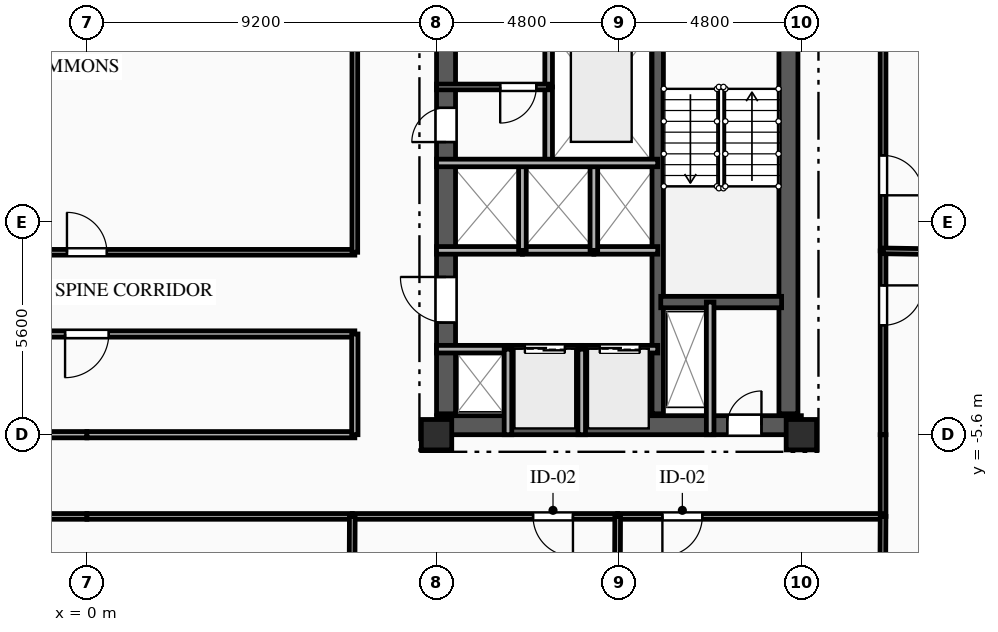
"""IFC4 building model, lengths in metres.
Left out: names, types, materials, properties, quantities, classifications, styles, units other than length and angle.
Written with IfcOpenShell. Run it as: python <this file> out.ifc"""

import sys

from ifc_helpers import new_model, si_unit, direction, frame, frame_2d, origin, origin_2d, place, context, subcontext, project, spatial, rectangle, extrude, element, fill, save


model = new_model("IFC4")
c1 = context("Model", 3, precision=1e-05, world=origin(), true_north=direction((0.0, 1.0)))
c2 = subcontext(c1, "Body", "Model", "MODEL_VIEW")
j1 = project(units=[si_unit("LENGTHUNIT", "METRE"), si_unit("PLANEANGLEUNIT", "RADIAN")], contexts=[c1])
p1 = place(None, origin())
s1 = spatial("IfcSite", under=j1, at=p1, CompositionType="ELEMENT")
p2 = place(p1, origin())
s2 = spatial("IfcBuilding", under=s1, at=p2, CompositionType="ELEMENT")
p3 = place(p2, frame((0.0, 0.0, 196.4)))
s3 = spatial("IfcBuildingStorey", under=s2, at=p3, CompositionType="ELEMENT", Elevation=196.4)
for number, where, z_axis, x_axis in (
    (1, (9.2, -5.6, 0.0), (0.0, 0.0, 1.0), (1.0, 0.0, 0.0)),
    (2, (18.8, -5.6, 0.0), (0.0, 0.0, 1.0), (1.0, 0.0, 0.0)),
):
    element("IfcColumn", number, at=place(p3, frame(where, z_axis=z_axis, x_axis=x_axis)), inside=s3, PredefinedType="COLUMN", context=c2, shape_type="SweptSolid", body=[
        extrude(rectangle(XDim=0.8, YDim=0.8, at=origin_2d()), origin(), (0.0, 0.0, 1.0), 3.35),
    ])
p4 = place(p3, frame((9.2, -5.35, 0.0), z_axis=(0.0, 0.0, 1.0), x_axis=(1.0, 0.0, 0.0)))
e3 = element("IfcWall", 3, at=p4, inside=s3, PredefinedType="SHEAR", context=c2, shape_type="SweptSolid", body=[
    extrude(rectangle(XDim=9.6, YDim=0.5, at=frame_2d((4.8, 0.0))), origin(), (0.0, 0.0, 1.0), 3.04),
])
p5 = place(p4, frame((7.65, 0.0, 0.0)))
e4 = element("IfcOpeningElement", 4, at=p5, cuts=e3, PredefinedType="OPENING", context=c2, shape_type="SweptSolid", body=[
    extrude(rectangle(XDim=0.9, YDim=2.1, at=frame_2d((0.45, 1.05))), frame((0.0, 0.26, 0.0), z_axis=(0.0, -1.0, 0.0), x_axis=(1.0, 0.0, 0.0)), (0.0, 0.0, 1.0), 0.52),
])
p6 = place(p3, frame((9.45, -5.05, 0.0), z_axis=(0.0, 0.0, 1.0), x_axis=(0.0, 1.0, 0.0)))
e5 = element("IfcWall", 5, at=p6, inside=s3, PredefinedType="SHEAR", context=c2, shape_type="SweptSolid", body=[
    extrude(rectangle(XDim=10.1, YDim=0.5, at=frame_2d((5.05, 0.0))), origin(), (0.0, 0.0, 1.0), 3.04),
])
p7 = place(p6, frame((7.15, 0.0, 0.0)))
e6 = element("IfcOpeningElement", 6, at=p7, cuts=e5, PredefinedType="OPENING", context=c2, shape_type="SweptSolid", body=[
    extrude(rectangle(XDim=0.9, YDim=2.1, at=frame_2d((0.45, 1.05))), frame((0.0, 0.26, 0.0), z_axis=(0.0, -1.0, 0.0), x_axis=(1.0, 0.0, 0.0)), (0.0, 0.0, 1.0), 0.52),
])
p8 = place(p6, frame((2.4, 0.0, 0.0)))
e7 = element("IfcOpeningElement", 7, at=p8, cuts=e5, PredefinedType="OPENING", context=c2, shape_type="SweptSolid", body=[
    extrude(rectangle(XDim=1.2, YDim=2.15, at=frame_2d((0.6, 1.075))), frame((0.0, 0.26, 0.0), z_axis=(0.0, -1.0, 0.0), x_axis=(1.0, 0.0, 0.0)), (0.0, 0.0, 1.0), 0.52),
])
p9 = place(p3, frame((18.46, -5.05, 0.0), z_axis=(0.0, 0.0, 1.0), x_axis=(0.0, 1.0, 0.0)))
e8 = element("IfcWall", 8, at=p9, inside=s3, PredefinedType="SHEAR", context=c2, shape_type="SweptSolid", body=[
    extrude(rectangle(XDim=10.1, YDim=0.5, at=frame_2d((5.05, 0.0))), origin(), (0.0, 0.0, 1.0), 3.04),
])
p10 = place(p3, frame((15.02, -5.05, 0.0), z_axis=(0.0, 0.0, 1.0), x_axis=(0.0, 1.0, 0.0)))
e9 = element("IfcWall", 9, at=p10, inside=s3, PredefinedType="SHEAR", context=c2, shape_type="SweptSolid", body=[
    extrude(rectangle(XDim=10.1, YDim=0.3, at=frame_2d((5.05, 0.0))), origin(), (0.0, 0.0, 1.0), 3.04),
])
p11 = place(p3, frame((15.1, -2.11, 0.0), z_axis=(0.0, 0.0, 1.0), x_axis=(1.0, 0.0, 0.0)))
e10 = element("IfcWall", 10, at=p11, inside=s3, PredefinedType="SHEAR", context=c2, shape_type="SweptSolid", body=[
    extrude(rectangle(XDim=3.18, YDim=0.3, at=frame_2d((1.59, 0.0))), origin(), (0.0, 0.0, 1.0), 3.04),
])
p12 = place(p3, frame((16.4, -2.11, 0.0), z_axis=(0.0, 0.0, 1.0), x_axis=(0.0, -1.0, 0.0)))
e11 = element("IfcWall", 11, at=p12, inside=s3, PredefinedType="PARTITIONING", context=c2, shape_type="SweptSolid", body=[
    extrude(rectangle(XDim=3.49, YDim=0.2, at=frame_2d((1.745, 0.0))), origin(), (0.0, 0.0, 1.0), 3.04),
])
p13 = place(p3, frame((12.15, 3.55, 0.0), z_axis=(0.0, 0.0, 1.0), x_axis=(0.0, -1.0, 0.0)))
e12 = element("IfcWall", 12, at=p13, inside=s3, PredefinedType="PARTITIONING", context=c2, shape_type="SweptSolid", body=[
    extrude(rectangle(XDim=2.0, YDim=0.2, at=frame_2d((1.0, 0.0))), origin(), (0.0, 0.0, 1.0), 3.04),
])
p14 = place(p3, frame((12.15, 5.6, 0.0), z_axis=(0.0, 0.0, 1.0), x_axis=(0.0, -1.0, 0.0)))
e13 = element("IfcWall", 13, at=p14, inside=s3, PredefinedType="PARTITIONING", context=c2, shape_type="SweptSolid", body=[
    extrude(rectangle(XDim=2.05, YDim=0.2, at=frame_2d((1.025, 0.0))), origin(), (0.0, 0.0, 1.0), 3.04),
])
p15 = place(p3, frame((12.15, 3.55, 0.0), z_axis=(0.0, 0.0, 1.0), x_axis=(-1.0, 0.0, 0.0)))
e14 = element("IfcWall", 14, at=p15, inside=s3, PredefinedType="PARTITIONING", context=c2, shape_type="SweptSolid", body=[
    extrude(rectangle(XDim=2.95, YDim=0.15, at=frame_2d((1.475, 0.0))), origin(), (0.0, 0.0, 1.0), 3.04),
])
p16 = place(p15, frame((0.325, 0.0, 0.0)))
e15 = element("IfcOpeningElement", 15, at=p16, cuts=e14, PredefinedType="OPENING", context=c2, shape_type="SweptSolid", body=[
    extrude(rectangle(XDim=0.95, YDim=2.1, at=frame_2d((0.475, 1.05))), frame((0.0, 0.085, 0.0), z_axis=(0.0, -1.0, 0.0), x_axis=(1.0, 0.0, 0.0)), (0.0, 0.0, 1.0), 0.17),
])
p17 = place(p3, frame((9.2, -3.35, 0.0), z_axis=(0.0, 0.0, 1.0), x_axis=(1.0, 0.0, 0.0)))
e16 = element("IfcWall", 16, at=p17, inside=s3, PredefinedType="PARTITIONING", context=c2, shape_type="SweptSolid", body=[
    extrude(rectangle(XDim=1.88, YDim=0.2, at=frame_2d((0.94, 0.0))), origin(), (0.0, 0.0, 1.0), 2.755),
])
p18 = place(p3, frame((11.08, -3.35, 0.0), z_axis=(0.0, 0.0, 1.0), x_axis=(1.0, 0.0, 0.0)))
e17 = element("IfcWall", 17, at=p18, inside=s3, PredefinedType="PARTITIONING", context=c2, shape_type="SweptSolid", body=[
    extrude(rectangle(XDim=1.94, YDim=0.2, at=frame_2d((0.97, 0.0))), origin(), (0.0, 0.0, 1.0), 3.04),
])
p19 = place(p18, frame((0.445, 0.0, 0.0)))
e18 = element("IfcOpeningElement", 18, at=p19, cuts=e17, PredefinedType="OPENING", context=c2, shape_type="SweptSolid", body=[
    extrude(rectangle(XDim=1.05, YDim=2.1, at=frame_2d((0.525, 1.05))), frame((0.0, 0.11, 0.0), z_axis=(0.0, -1.0, 0.0), x_axis=(1.0, 0.0, 0.0)), (0.0, 0.0, 1.0), 0.22),
])
p20 = place(p3, frame((13.02, -3.35, 0.0), z_axis=(0.0, 0.0, 1.0), x_axis=(1.0, 0.0, 0.0)))
e19 = element("IfcWall", 19, at=p20, inside=s3, PredefinedType="PARTITIONING", context=c2, shape_type="SweptSolid", body=[
    extrude(rectangle(XDim=2.0, YDim=0.2, at=frame_2d((1.0, 0.0))), origin(), (0.0, 0.0, 1.0), 3.04),
])
p21 = place(p20, frame((0.475, 0.0, 0.0)))
e20 = element("IfcOpeningElement", 20, at=p21, cuts=e19, PredefinedType="OPENING", context=c2, shape_type="SweptSolid", body=[
    extrude(rectangle(XDim=1.05, YDim=2.1, at=frame_2d((0.525, 1.05))), frame((0.0, 0.11, 0.0), z_axis=(0.0, -1.0, 0.0), x_axis=(1.0, 0.0, 0.0)), (0.0, 0.0, 1.0), 0.22),
])
p22 = place(p3, frame((11.46, -0.75, 0.0), z_axis=(0.0, 0.0, 1.0), x_axis=(-1.0, 0.0, 0.0)))
e21 = element("IfcWall", 21, at=p22, inside=s3, PredefinedType="PARTITIONING", context=c2, shape_type="SweptSolid", body=[
    extrude(rectangle(XDim=2.26, YDim=0.2, at=frame_2d((1.13, 0.0))), origin(), (0.0, 0.0, 1.0), 3.04),
])
p23 = place(p3, frame((13.34, -0.75, 0.0), z_axis=(0.0, 0.0, 1.0), x_axis=(-1.0, 0.0, 0.0)))
e22 = element("IfcWall", 22, at=p23, inside=s3, PredefinedType="PARTITIONING", context=c2, shape_type="SweptSolid", body=[
    extrude(rectangle(XDim=1.88, YDim=0.2, at=frame_2d((0.94, 0.0))), origin(), (0.0, 0.0, 1.0), 3.04),
])
p24 = place(p3, frame((15.02, -0.75, 0.0), z_axis=(0.0, 0.0, 1.0), x_axis=(-1.0, 0.0, 0.0)))
e23 = element("IfcWall", 23, at=p24, inside=s3, PredefinedType="PARTITIONING", context=c2, shape_type="SweptSolid", body=[
    extrude(rectangle(XDim=1.68, YDim=0.2, at=frame_2d((0.84, 0.0))), origin(), (0.0, 0.0, 1.0), 3.04),
])
for number, where, z_axis, x_axis in (
    (24, (11.08, -5.6, 0.0), (0.0, 0.0, 1.0), (0.0, 1.0, 0.0)),
    (25, (13.02, -5.6, 0.0), (0.0, 0.0, 1.0), (0.0, 1.0, 0.0)),
):
    element("IfcWall", number, at=place(p3, frame(where, z_axis=z_axis, x_axis=x_axis)), inside=s3, PredefinedType="PARTITIONING", context=c2, shape_type="SweptSolid", body=[
        extrude(rectangle(XDim=2.25, YDim=0.2, at=frame_2d((1.125, 0.0))), origin(), (0.0, 0.0, 1.0), 3.04),
    ])
for number, where, z_axis, x_axis in (
    (26, (11.46, -0.75, 0.0), (0.0, 0.0, 1.0), (0.0, 1.0, 0.0)),
    (27, (13.34, -0.75, 0.0), (0.0, 0.0, 1.0), (0.0, 1.0, 0.0)),
):
    element("IfcWall", number, at=place(p3, frame(where, z_axis=z_axis, x_axis=x_axis)), inside=s3, PredefinedType="PARTITIONING", context=c2, shape_type="SweptSolid", body=[
        extrude(rectangle(XDim=2.3, YDim=0.2, at=frame_2d((1.15, 0.0))), origin(), (0.0, 0.0, 1.0), 3.04),
    ])
p25 = place(p3, frame((0.0, -7.75, 0.0), z_axis=(0.0, 0.0, 1.0), x_axis=(-1.0, 0.0, 0.0)))
e28 = element("IfcWall", 28, at=p25, inside=s3, PredefinedType="PARTITIONING", context=c2, shape_type="SweptSolid", body=[
    extrude(rectangle(XDim=6.983, YDim=0.15, at=frame_2d((3.491, 0.0))), origin(), (0.0, 0.0, 1.0), 3.04),
])
p26 = place(p25, frame((1.177, 0.0, 0.0)))
e29 = element("IfcOpeningElement", 29, at=p26, cuts=e28, PredefinedType="OPENING", context=c2, shape_type="SweptSolid", body=[
    extrude(rectangle(XDim=1.05, YDim=2.15, at=frame_2d((0.525, 1.075))), frame((0.0, 0.085, 0.0), z_axis=(0.0, -1.0, 0.0), x_axis=(1.0, 0.0, 0.0)), (0.0, 0.0, 1.0), 0.17),
])
p27 = place(p3, frame((-7.05, -5.6, 0.0), z_axis=(0.0, 0.0, 1.0), x_axis=(1.0, 0.0, 0.0)))
e30 = element("IfcWall", 30, at=p27, inside=s3, PredefinedType="PARTITIONING", context=c2, shape_type="SweptSolid", body=[
    extrude(rectangle(XDim=7.05, YDim=0.165, at=frame_2d((3.525, 0.0))), origin(), (0.0, 0.0, 1.0), 2.525),
])
p28 = place(p3, frame((20.95, -5.6, 0.0), z_axis=(0.0, 0.0, 1.0), x_axis=(0.0, -1.0, 0.0)))
e31 = element("IfcWall", 31, at=p28, inside=s3, PredefinedType="PARTITIONING", context=c2, shape_type="SweptSolid", body=[
    extrude(rectangle(XDim=2.15, YDim=0.15, at=frame_2d((1.075, 0.0))), origin(), (0.0, 0.0, 1.0), 3.04),
])
p29 = place(p3, frame((6.983, -7.75, 0.0), z_axis=(0.0, 0.0, 1.0), x_axis=(-1.0, 0.0, 0.0)))
e32 = element("IfcWall", 32, at=p29, inside=s3, PredefinedType="PARTITIONING", context=c2, shape_type="SweptSolid", body=[
    extrude(rectangle(XDim=6.983, YDim=0.15, at=frame_2d((3.491, 0.0))), origin(), (0.0, 0.0, 1.0), 3.04),
])
p30 = place(p3, frame((13.967, -7.75, 0.0), z_axis=(0.0, 0.0, 1.0), x_axis=(-1.0, 0.0, 0.0)))
e33 = element("IfcWall", 33, at=p30, inside=s3, PredefinedType="PARTITIONING", context=c2, shape_type="SweptSolid", body=[
    extrude(rectangle(XDim=6.984, YDim=0.15, at=frame_2d((3.492, 0.0))), origin(), (0.0, 0.0, 1.0), 3.04),
])
p31 = place(p30, frame((1.177, 0.0, 0.0)))
e34 = element("IfcOpeningElement", 34, at=p31, cuts=e33, PredefinedType="OPENING", context=c2, shape_type="SweptSolid", body=[
    extrude(rectangle(XDim=1.05, YDim=2.15, at=frame_2d((0.525, 1.075))), frame((0.0, 0.085, 0.0), z_axis=(0.0, -1.0, 0.0), x_axis=(1.0, 0.0, 0.0)), (0.0, 0.0, 1.0), 0.17),
])
p32 = place(p3, frame((20.95, -7.75, 0.0), z_axis=(0.0, 0.0, 1.0), x_axis=(-1.0, 0.0, 0.0)))
e35 = element("IfcWall", 35, at=p32, inside=s3, PredefinedType="PARTITIONING", context=c2, shape_type="SweptSolid", body=[
    extrude(rectangle(XDim=6.983, YDim=0.15, at=frame_2d((3.492, 0.0))), origin(), (0.0, 0.0, 1.0), 3.04),
])
p33 = place(p32, frame((4.757, 0.0, 0.0)))
e36 = element("IfcOpeningElement", 36, at=p33, cuts=e35, PredefinedType="OPENING", context=c2, shape_type="SweptSolid", body=[
    extrude(rectangle(XDim=1.05, YDim=2.15, at=frame_2d((0.525, 1.075))), frame((0.0, 0.085, 0.0), z_axis=(0.0, -1.0, 0.0), x_axis=(1.0, 0.0, 0.0)), (0.0, 0.0, 1.0), 0.17),
])
p34 = place(p3, frame((0.0, -5.6, 0.0), z_axis=(0.0, 0.0, 1.0), x_axis=(1.0, 0.0, 0.0)))
e37 = element("IfcWall", 37, at=p34, inside=s3, PredefinedType="PARTITIONING", context=c2, shape_type="SweptSolid", body=[
    extrude(rectangle(XDim=7.05, YDim=0.165, at=frame_2d((3.525, 0.0))), origin(), (0.0, 0.0, 1.0), 2.525),
])
p35 = place(p3, frame((20.95, -0.763, 0.0), z_axis=(0.0, 0.0, 1.0), x_axis=(0.0, -1.0, 0.0)))
e38 = element("IfcWall", 38, at=p35, inside=s3, PredefinedType="PARTITIONING", context=c2, shape_type="SweptSolid", body=[
    extrude(rectangle(XDim=4.837, YDim=0.15, at=frame_2d((2.418, 0.0))), origin(), (0.0, 0.0, 1.0), 2.695),
])
p36 = place(p35, frame((0.908, 0.0, 0.0)))
e39 = element("IfcOpeningElement", 39, at=p36, cuts=e38, PredefinedType="OPENING", context=c2, shape_type="SweptSolid", body=[
    extrude(rectangle(XDim=1.05, YDim=2.15, at=frame_2d((0.525, 1.075))), frame((0.0, 0.085, 0.0), z_axis=(0.0, -1.0, 0.0), x_axis=(1.0, 0.0, 0.0)), (0.0, 0.0, 1.0), 0.17),
])
p37 = place(p3, frame((20.95, 8.5, 0.0), z_axis=(0.0, 0.0, 1.0), x_axis=(0.0, -1.0, 0.0)))
e40 = element("IfcWall", 40, at=p37, inside=s3, PredefinedType="PARTITIONING", context=c2, shape_type="SweptSolid", body=[
    extrude(rectangle(XDim=9.263, YDim=0.15, at=frame_2d((4.632, 0.0))), origin(), (0.0, 0.0, 1.0), 2.695),
])
p38 = place(p37, frame((6.751, 0.0, 0.0)))
e41 = element("IfcOpeningElement", 41, at=p38, cuts=e40, PredefinedType="OPENING", context=c2, shape_type="SweptSolid", body=[
    extrude(rectangle(XDim=1.05, YDim=2.15, at=frame_2d((0.525, 1.075))), frame((0.0, 0.085, 0.0), z_axis=(0.0, -1.0, 0.0), x_axis=(1.0, 0.0, 0.0)), (0.0, 0.0, 1.0), 0.17),
])
p39 = place(p3, frame((-7.05, -0.8, 0.0), z_axis=(0.0, 0.0, 1.0), x_axis=(1.0, 0.0, 0.0)))
e42 = element("IfcWall", 42, at=p39, inside=s3, PredefinedType="PARTITIONING", context=c2, shape_type="SweptSolid", body=[
    extrude(rectangle(XDim=14.1, YDim=0.15, at=frame_2d((7.05, 0.0))), origin(), (0.0, 0.0, 1.0), 3.04),
])
p40 = place(p39, frame((6.525, 0.0, 0.0)))
e43 = element("IfcOpeningElement", 43, at=p40, cuts=e42, PredefinedType="OPENING", context=c2, shape_type="SweptSolid", body=[
    extrude(rectangle(XDim=1.05, YDim=2.15, at=frame_2d((0.525, 1.075))), frame((0.0, 0.085, 0.0), z_axis=(0.0, -1.0, 0.0), x_axis=(1.0, 0.0, 0.0)), (0.0, 0.0, 1.0), 0.17),
])
p41 = place(p3, frame((7.05, -2.95, 0.0), z_axis=(0.0, 0.0, 1.0), x_axis=(-1.0, 0.0, 0.0)))
e44 = element("IfcWall", 44, at=p41, inside=s3, PredefinedType="PARTITIONING", context=c2, shape_type="SweptSolid", body=[
    extrude(rectangle(XDim=14.1, YDim=0.165, at=frame_2d((7.05, 0.0))), origin(), (0.0, 0.0, 1.0), 3.04),
])
p42 = place(p41, frame((6.475, 0.0, 0.0)))
e45 = element("IfcOpeningElement", 45, at=p42, cuts=e44, PredefinedType="OPENING", context=c2, shape_type="SweptSolid", body=[
    extrude(rectangle(XDim=1.15, YDim=2.15, at=frame_2d((0.575, 1.075))), frame((0.0, 0.093, 0.0), z_axis=(0.0, -1.0, 0.0), x_axis=(1.0, 0.0, 0.0)), (0.0, 0.0, 1.0), 0.185),
])
p43 = place(p3, frame((7.05, -0.8, 0.0), z_axis=(0.0, 0.0, 1.0), x_axis=(0.0, 1.0, 0.0)))
e46 = element("IfcWall", 46, at=p43, inside=s3, PredefinedType="PARTITIONING", context=c2, shape_type="SweptSolid", body=[
    extrude(rectangle(XDim=9.3, YDim=0.15, at=frame_2d((4.65, 0.0))), origin(), (0.0, 0.0, 1.0), 3.04),
])
p44 = place(p3, frame((7.05, -5.6, 0.0), z_axis=(0.0, 0.0, 1.0), x_axis=(0.0, 1.0, 0.0)))
e47 = element("IfcWall", 47, at=p44, inside=s3, PredefinedType="PARTITIONING", context=c2, shape_type="SweptSolid", body=[
    extrude(rectangle(XDim=2.65, YDim=0.165, at=frame_2d((1.325, 0.0))), origin(), (0.0, 0.0, 1.0), 3.04),
])
p45 = place(p3, frame((20.95, -0.763, 0.0), z_axis=(0.0, 0.0, 1.0), x_axis=(0.999875696831, -0.015766765259, 0.0)))
e48 = element("IfcWall", 48, at=p45, inside=s3, PredefinedType="PARTITIONING", context=c2, shape_type="SweptSolid", body=[
    extrude(rectangle(XDim=2.787, YDim=0.15, at=frame_2d((1.394, 0.0))), origin(), (0.0, 0.0, 1.0), 3.04),
])
p46 = place(p3, frame((20.906, -16.708, 0.0), z_axis=(0.0, 0.0, 1.0), x_axis=(0.004905642486, 0.999987967264, 0.0)))
e49 = element("IfcWall", 49, at=p46, inside=s3, PredefinedType="PARTITIONING", context=c2, shape_type="SweptSolid", body=[
    extrude(rectangle(XDim=8.958, YDim=0.15, at=frame_2d((4.479, 0.0))), origin(), (0.0, 0.0, 1.0), 2.665),
])
p47 = place(p3, frame((6.983, -7.75, 0.0), z_axis=(0.0, 0.0, 1.0), x_axis=(-0.004159465807, -0.999991349385, 0.0)))
e50 = element("IfcWall", 50, at=p47, inside=s3, PredefinedType="PARTITIONING", context=c2, shape_type="SweptSolid", body=[
    extrude(rectangle(XDim=10.506, YDim=0.15, at=frame_2d((5.253, 0.0))), origin(), (0.0, 0.0, 1.0), 3.04),
])
p48 = place(p3, frame((13.967, -7.75, 0.0), z_axis=(0.0, 0.0, 1.0), x_axis=(-0.003909528994, -0.999992357762, 0.0)))
e51 = element("IfcWall", 51, at=p48, inside=s3, PredefinedType="PARTITIONING", context=c2, shape_type="SweptSolid", body=[
    extrude(rectangle(XDim=11.24, YDim=0.15, at=frame_2d((5.62, 0.0))), origin(), (0.0, 0.0, 1.0), 3.04),
])
p49 = place(p3, frame((9.2, 1.55, 0.0), z_axis=(0.0, 0.0, 1.0), x_axis=(1.0, 0.0, 0.0)))
e52 = element("IfcWall", 52, at=p49, inside=s3, PredefinedType="PARTITIONING", context=c2, shape_type="SweptSolid", body=[
    extrude(rectangle(XDim=5.82, YDim=0.2, at=frame_2d((2.91, 0.0))), origin(), (0.0, 0.0, 1.0), 3.04),
])
p50 = place(p5, origin())
e53 = element("IfcDoor", 53, at=p50, inside=s3, OperationType="SINGLE_SWING_RIGHT", PredefinedType="DOOR", context=c2, shape_type="SweptSolid", body=[
    extrude(rectangle(XDim=0.9, YDim=2.1, at=frame_2d((0.45, 1.05))), frame((0.0, 0.025, 0.0), z_axis=(0.0, -1.0, 0.0), x_axis=(1.0, 0.0, 0.0)), (0.0, 0.0, 1.0), 0.05),
])
fill(e4, e53)
p51 = place(p16, origin())
e54 = element("IfcDoor", 54, at=p51, inside=s3, OperationType="SINGLE_SWING_RIGHT", PredefinedType="DOOR", context=c2, shape_type="SweptSolid", body=[
    extrude(rectangle(XDim=0.95, YDim=2.1, at=frame_2d((0.475, 1.05))), frame((0.0, 0.025, 0.0), z_axis=(0.0, -1.0, 0.0), x_axis=(1.0, 0.0, 0.0)), (0.0, 0.0, 1.0), 0.05),
])
fill(e15, e54)
p52 = place(p7, origin())
e55 = element("IfcDoor", 55, at=p52, inside=s3, OperationType="SINGLE_SWING_LEFT", PredefinedType="DOOR", context=c2, shape_type="SweptSolid", body=[
    extrude(rectangle(XDim=0.9, YDim=2.1, at=frame_2d((0.45, 1.05))), frame((0.0, 0.025, 0.0), z_axis=(0.0, -1.0, 0.0), x_axis=(1.0, 0.0, 0.0)), (0.0, 0.0, 1.0), 0.05),
])
fill(e6, e55)
p53 = place(p19, origin())
e56 = element("IfcDoor", 56, at=p53, inside=s3, OperationType="DOUBLE_DOOR_SLIDING", PredefinedType="DOOR", context=c2, shape_type="SweptSolid", body=[
    extrude(rectangle(XDim=1.05, YDim=2.1, at=frame_2d((0.525, 1.05))), frame((0.0, 0.025, 0.0), z_axis=(0.0, -1.0, 0.0), x_axis=(1.0, 0.0, 0.0)), (0.0, 0.0, 1.0), 0.05),
])
fill(e18, e56)
p54 = place(p21, origin())
e57 = element("IfcDoor", 57, at=p54, inside=s3, OperationType="DOUBLE_DOOR_SLIDING", PredefinedType="DOOR", context=c2, shape_type="SweptSolid", body=[
    extrude(rectangle(XDim=1.05, YDim=2.1, at=frame_2d((0.525, 1.05))), frame((0.0, 0.025, 0.0), z_axis=(0.0, -1.0, 0.0), x_axis=(1.0, 0.0, 0.0)), (0.0, 0.0, 1.0), 0.05),
])
fill(e20, e57)
p55 = place(p8, origin())
e58 = element("IfcDoor", 58, at=p55, inside=s3, OperationType="SINGLE_SWING_RIGHT", PredefinedType="DOOR", context=c2, shape_type="SweptSolid", body=[
    extrude(rectangle(XDim=1.2, YDim=2.15, at=frame_2d((0.6, 1.075))), frame((0.0, 0.025, 0.0), z_axis=(0.0, -1.0, 0.0), x_axis=(1.0, 0.0, 0.0)), (0.0, 0.0, 1.0), 0.05),
])
fill(e7, e58)
p56 = place(p31, origin())
e59 = element("IfcDoor", 59, at=p56, inside=s3, OperationType="SINGLE_SWING_LEFT", PredefinedType="DOOR", context=c2, shape_type="SweptSolid", body=[
    extrude(rectangle(XDim=1.05, YDim=2.15, at=frame_2d((0.525, 1.075))), frame((0.0, 0.025, 0.0), z_axis=(0.0, -1.0, 0.0), x_axis=(1.0, 0.0, 0.0)), (0.0, 0.0, 1.0), 0.05),
])
fill(e34, e59)
p57 = place(p33, origin())
e60 = element("IfcDoor", 60, at=p57, inside=s3, OperationType="SINGLE_SWING_RIGHT", PredefinedType="DOOR", context=c2, shape_type="SweptSolid", body=[
    extrude(rectangle(XDim=1.05, YDim=2.15, at=frame_2d((0.525, 1.075))), frame((0.0, 0.025, 0.0), z_axis=(0.0, -1.0, 0.0), x_axis=(1.0, 0.0, 0.0)), (0.0, 0.0, 1.0), 0.05),
])
fill(e36, e60)
p58 = place(p36, origin())
e61 = element("IfcDoor", 61, at=p58, inside=s3, OperationType="SINGLE_SWING_LEFT", PredefinedType="DOOR", context=c2, shape_type="SweptSolid", body=[
    extrude(rectangle(XDim=1.05, YDim=2.15, at=frame_2d((0.525, 1.075))), frame((0.0, 0.025, 0.0), z_axis=(0.0, -1.0, 0.0), x_axis=(1.0, 0.0, 0.0)), (0.0, 0.0, 1.0), 0.05),
])
fill(e39, e61)
p59 = place(p38, origin())
e62 = element("IfcDoor", 62, at=p59, inside=s3, OperationType="SINGLE_SWING_RIGHT", PredefinedType="DOOR", context=c2, shape_type="SweptSolid", body=[
    extrude(rectangle(XDim=1.05, YDim=2.15, at=frame_2d((0.525, 1.075))), frame((0.0, 0.025, 0.0), z_axis=(0.0, -1.0, 0.0), x_axis=(1.0, 0.0, 0.0)), (0.0, 0.0, 1.0), 0.05),
])
fill(e41, e62)
p60 = place(p40, origin())
e63 = element("IfcDoor", 63, at=p60, inside=s3, OperationType="SINGLE_SWING_LEFT", PredefinedType="DOOR", context=c2, shape_type="SweptSolid", body=[
    extrude(rectangle(XDim=1.05, YDim=2.15, at=frame_2d((0.525, 1.075))), frame((0.0, 0.025, 0.0), z_axis=(0.0, -1.0, 0.0), x_axis=(1.0, 0.0, 0.0)), (0.0, 0.0, 1.0), 0.05),
])
fill(e43, e63)
p61 = place(p42, origin())
e64 = element("IfcDoor", 64, at=p61, inside=s3, OperationType="SINGLE_SWING_RIGHT", PredefinedType="DOOR", context=c2, shape_type="SweptSolid", body=[
    extrude(rectangle(XDim=1.15, YDim=2.15, at=frame_2d((0.575, 1.075))), frame((0.0, 0.025, 0.0), z_axis=(0.0, -1.0, 0.0), x_axis=(1.0, 0.0, 0.0)), (0.0, 0.0, 1.0), 0.05),
])
fill(e45, e64)
save(model, sys.argv[1])
